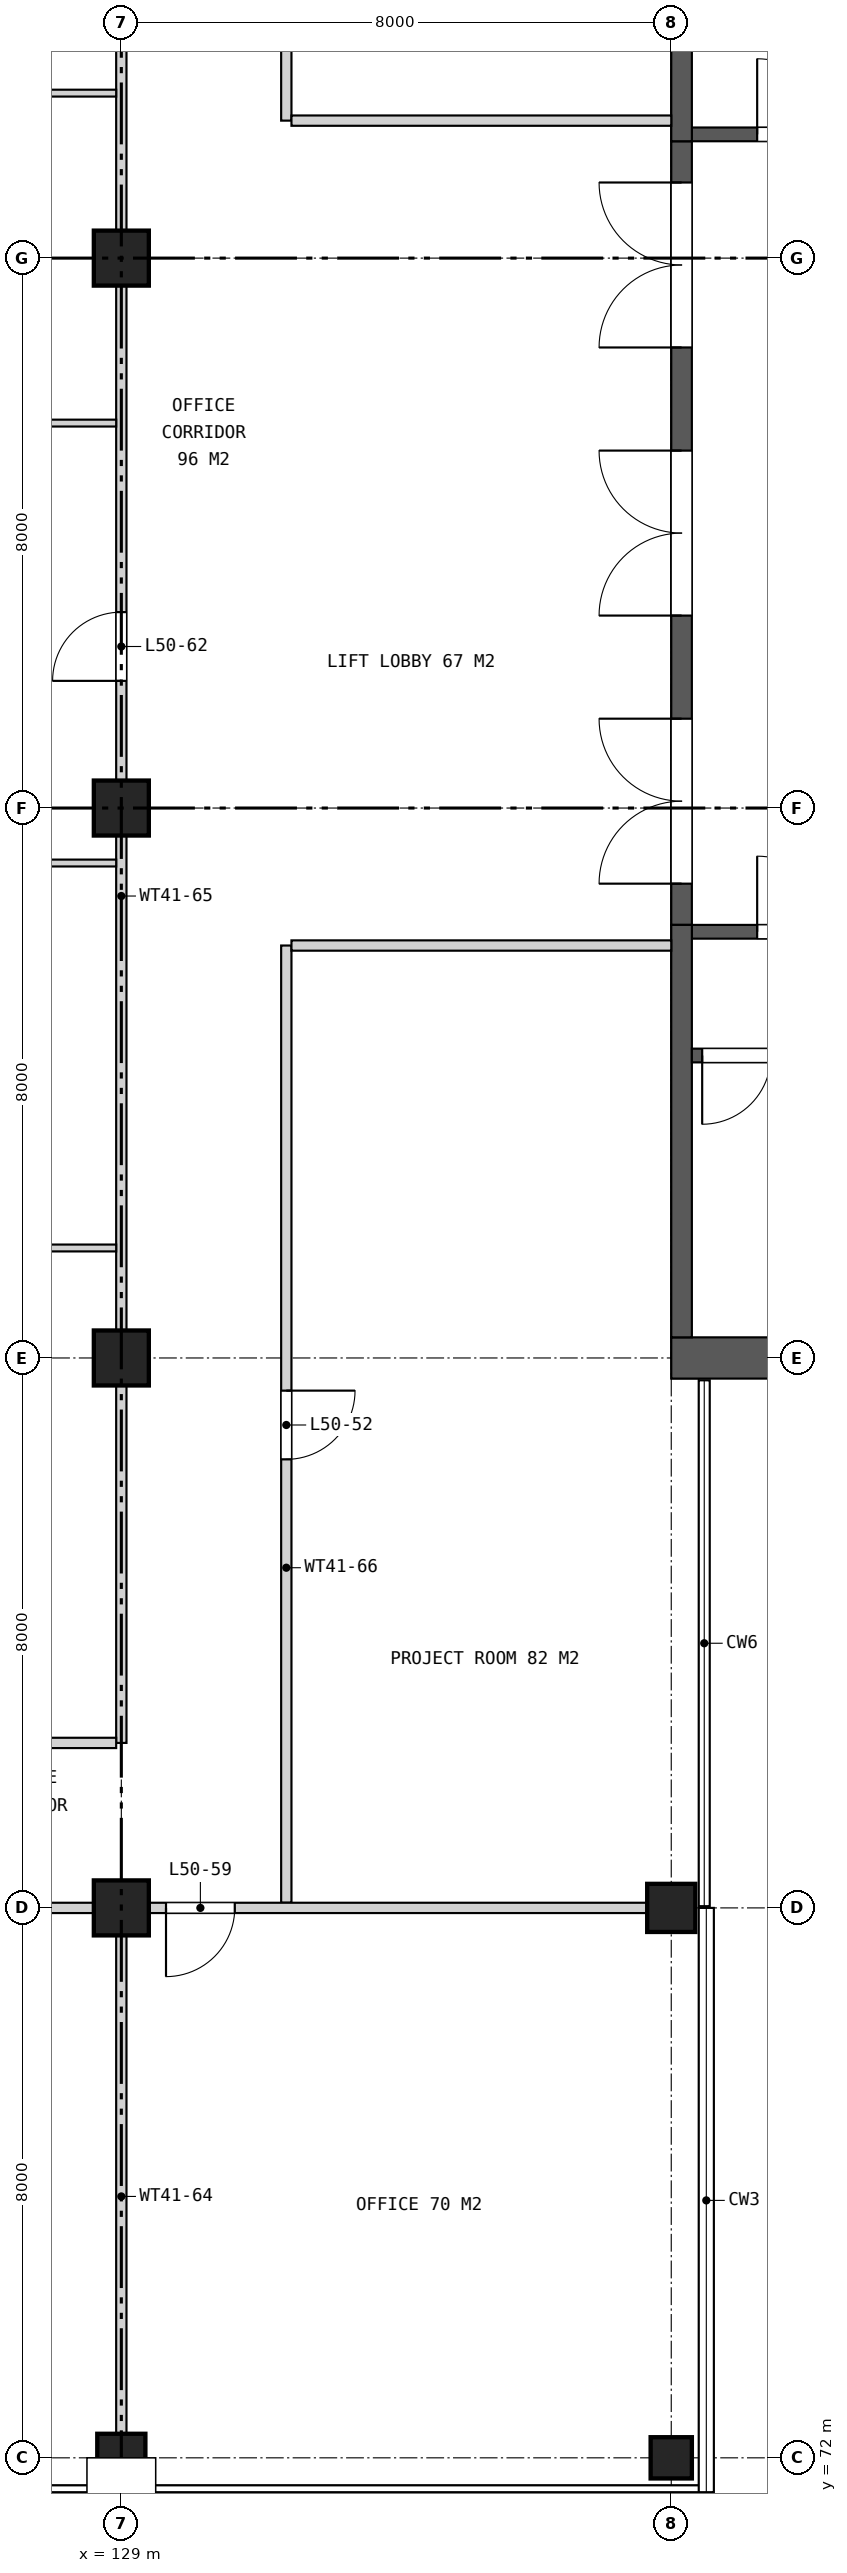
"""IFC4 building model, lengths in metres.
Left out: names, types, materials, properties, quantities, classifications, styles, units other than length and angle.
Written with IfcOpenShell. Run it as: python <this file> out.ifc"""

import sys

from ifc_helpers import new_model, si_unit, direction, frame, frame_2d, origin, origin_2d, place, context, subcontext, project, spatial, rectangle, extrude, element, fill, save


model = new_model("IFC4")
c1 = context("Model", 3, precision=1e-05, world=origin(), true_north=direction((0.0, 1.0)))
c2 = subcontext(c1, "Body", "Model", "MODEL_VIEW")
j1 = project(units=[si_unit("LENGTHUNIT", "METRE"), si_unit("PLANEANGLEUNIT", "RADIAN")], contexts=[c1])
p1 = place(None, origin())
s1 = spatial("IfcSite", under=j1, at=p1, CompositionType="ELEMENT")
p2 = place(p1, origin())
s2 = spatial("IfcBuilding", under=s1, at=p2, CompositionType="ELEMENT")
p3 = place(p2, frame((0.0, 0.0, 233.5)))
s3 = spatial("IfcBuildingStorey", under=s2, at=p3, CompositionType="ELEMENT", Elevation=233.5)
p4 = place(p3, frame((129.0, 72.0, 0.0), z_axis=(0.0, 0.0, 1.0), x_axis=(1.0, 0.0, 0.0)))
e1 = element("IfcColumn", 1, at=p4, inside=s3, PredefinedType="COLUMN", context=c2, shape_type="SweptSolid", body=[
    extrude(rectangle(XDim=0.7, YDim=0.7, at=origin_2d()), origin(), (0.0, 0.0, 1.0), 4.2),
])
for number, where, z_axis, x_axis in (
    (2, (129.0, 80.0, 0.0), (0.0, 0.0, 1.0), (1.0, 0.0, 0.0)),
    (3, (129.0, 88.0, 0.0), (0.0, 0.0, 1.0), (1.0, 0.0, 0.0)),
    (4, (129.0, 96.0, 0.0), (0.0, 0.0, 1.0), (1.0, 0.0, 0.0)),
    (5, (129.0, 104.0, 0.0), (0.0, 0.0, 1.0), (1.0, 0.0, 0.0)),
):
    element("IfcColumn", number, at=place(p3, frame(where, z_axis=z_axis, x_axis=x_axis)), inside=s3, PredefinedType="COLUMN", context=c2, shape_type="SweptSolid", body=[
        extrude(rectangle(XDim=0.8, YDim=0.8, at=origin_2d()), origin(), (0.0, 0.0, 1.0), 4.2),
    ])
p5 = place(p3, frame((137.0, 72.0, 0.0), z_axis=(0.0, 0.0, 1.0), x_axis=(1.0, 0.0, 0.0)))
e6 = element("IfcColumn", 6, at=p5, inside=s3, PredefinedType="COLUMN", context=c2, shape_type="SweptSolid", body=[
    extrude(rectangle(XDim=0.6, YDim=0.6, at=origin_2d()), origin(), (0.0, 0.0, 1.0), 4.2),
])
p6 = place(p3, frame((137.0, 80.0, 0.0), z_axis=(0.0, 0.0, 1.0), x_axis=(1.0, 0.0, 0.0)))
e7 = element("IfcColumn", 7, at=p6, inside=s3, PredefinedType="COLUMN", context=c2, shape_type="SweptSolid", body=[
    extrude(rectangle(XDim=0.7, YDim=0.7, at=origin_2d()), origin(), (0.0, 0.0, 1.0), 4.2),
])
p7 = place(p3, frame((137.0, 88.0, 0.0), z_axis=(0.0, 0.0, 1.0), x_axis=(1.0, 0.0, 0.0)))
e8 = element("IfcWall", 8, at=p7, inside=s3, PredefinedType="SHEAR", context=c2, shape_type="SweptSolid", body=[
    extrude(rectangle(XDim=7.1, YDim=0.6, at=frame_2d((3.55, 0.0))), origin(), (0.0, 0.0, 1.0), 4.2),
])
p8 = place(p3, frame((137.15, 94.3, 0.0), z_axis=(0.0, 0.0, 1.0), x_axis=(0.0, 1.0, 0.0)))
e9 = element("IfcWall", 9, at=p8, inside=s3, PredefinedType="SHEAR", context=c2, shape_type="SweptSolid", body=[
    extrude(rectangle(XDim=11.4, YDim=0.3, at=frame_2d((5.7, 0.0))), origin(), (0.0, 0.0, 1.0), 4.2),
])
p9 = place(p8, frame((0.6, 0.0, 0.0)))
e10 = element("IfcOpeningElement", 10, at=p9, cuts=e9, PredefinedType="OPENING", context=c2, shape_type="SweptSolid", body=[
    extrude(rectangle(XDim=2.4, YDim=2.4, at=frame_2d((1.2, 1.2))), frame((0.0, 0.16, 0.0), z_axis=(0.0, -1.0, 0.0), x_axis=(1.0, 0.0, 0.0)), (0.0, 0.0, 1.0), 0.32),
])
p10 = place(p8, frame((4.5, 0.0, 0.0)))
e11 = element("IfcOpeningElement", 11, at=p10, cuts=e9, PredefinedType="OPENING", context=c2, shape_type="SweptSolid", body=[
    extrude(rectangle(XDim=2.4, YDim=2.4, at=frame_2d((1.2, 1.2))), frame((0.0, 0.16, 0.0), z_axis=(0.0, -1.0, 0.0), x_axis=(1.0, 0.0, 0.0)), (0.0, 0.0, 1.0), 0.32),
])
p11 = place(p8, frame((8.4, 0.0, 0.0)))
e12 = element("IfcOpeningElement", 12, at=p11, cuts=e9, PredefinedType="OPENING", context=c2, shape_type="SweptSolid", body=[
    extrude(rectangle(XDim=2.4, YDim=2.4, at=frame_2d((1.2, 1.2))), frame((0.0, 0.16, 0.0), z_axis=(0.0, -1.0, 0.0), x_axis=(1.0, 0.0, 0.0)), (0.0, 0.0, 1.0), 0.32),
])
p12 = place(p3, frame((137.3, 105.8, 0.0), z_axis=(0.0, 0.0, 1.0), x_axis=(1.0, 0.0, 0.0)))
e13 = element("IfcWall", 13, at=p12, inside=s3, PredefinedType="SHEAR", context=c2, shape_type="SweptSolid", body=[
    extrude(rectangle(XDim=15.4, YDim=0.2, at=frame_2d((7.7, 0.0))), origin(), (0.0, 0.0, 1.0), 4.2),
])
p13 = place(p12, frame((0.95, 0.0, 0.0)))
e14 = element("IfcOpeningElement", 14, at=p13, cuts=e13, PredefinedType="OPENING", context=c2, shape_type="SweptSolid", body=[
    extrude(rectangle(XDim=1.1, YDim=2.1, at=frame_2d((0.55, 1.05))), frame((0.0, 0.11, 0.0), z_axis=(0.0, -1.0, 0.0), x_axis=(1.0, 0.0, 0.0)), (0.0, 0.0, 1.0), 0.22),
])
p14 = place(p3, frame((137.15, 105.7, 0.0), z_axis=(0.0, 0.0, 1.0), x_axis=(0.0, 1.0, 0.0)))
e15 = element("IfcWall", 15, at=p14, inside=s3, PredefinedType="SHEAR", context=c2, shape_type="SweptSolid", body=[
    extrude(rectangle(XDim=6.0, YDim=0.3, at=frame_2d((3.0, 0.0))), origin(), (0.0, 0.0, 1.0), 4.2),
])
p15 = place(p3, frame((137.3, 94.2, 0.0), z_axis=(0.0, 0.0, 1.0), x_axis=(1.0, 0.0, 0.0)))
e16 = element("IfcWall", 16, at=p15, inside=s3, PredefinedType="SHEAR", context=c2, shape_type="SweptSolid", body=[
    extrude(rectangle(XDim=15.4, YDim=0.2, at=frame_2d((7.7, 0.0))), origin(), (0.0, 0.0, 1.0), 4.2),
])
p16 = place(p15, frame((0.95, 0.0, 0.0)))
e17 = element("IfcOpeningElement", 17, at=p16, cuts=e16, PredefinedType="OPENING", context=c2, shape_type="SweptSolid", body=[
    extrude(rectangle(XDim=1.1, YDim=2.1, at=frame_2d((0.55, 1.05))), frame((0.0, 0.11, 0.0), z_axis=(0.0, -1.0, 0.0), x_axis=(1.0, 0.0, 0.0)), (0.0, 0.0, 1.0), 0.22),
])
p17 = place(p3, frame((137.15, 88.3, 0.0), z_axis=(0.0, 0.0, 1.0), x_axis=(0.0, 1.0, 0.0)))
e18 = element("IfcWall", 18, at=p17, inside=s3, PredefinedType="SHEAR", context=c2, shape_type="SweptSolid", body=[
    extrude(rectangle(XDim=6.0, YDim=0.3, at=frame_2d((3.0, 0.0))), origin(), (0.0, 0.0, 1.0), 4.2),
])
p18 = place(p3, frame((137.3, 92.4, 0.0), z_axis=(0.0, 0.0, 1.0), x_axis=(1.0, 0.0, 0.0)))
e19 = element("IfcWall", 19, at=p18, inside=s3, PredefinedType="SHEAR", context=c2, shape_type="SweptSolid", body=[
    extrude(rectangle(XDim=6.8, YDim=0.2, at=frame_2d((3.4, 0.0))), origin(), (0.0, 0.0, 1.0), 4.2),
])
p19 = place(p18, frame((0.15, 0.0, 0.0)))
e20 = element("IfcOpeningElement", 20, at=p19, cuts=e19, PredefinedType="OPENING", context=c2, shape_type="SweptSolid", body=[
    extrude(rectangle(XDim=1.0, YDim=2.1, at=frame_2d((0.5, 1.05))), frame((0.0, 0.11, 0.0), z_axis=(0.0, -1.0, 0.0), x_axis=(1.0, 0.0, 0.0)), (0.0, 0.0, 1.0), 0.22),
])
p20 = place(p3, frame((129.0, 71.68, 0.0), z_axis=(0.0, 0.0, 1.0), x_axis=(0.0, 1.0, 0.0)))
e21 = element("IfcWall", 21, at=p20, inside=s3, PredefinedType="PARTITIONING", context=c2, shape_type="SweptSolid", body=[
    extrude(rectangle(XDim=8.245, YDim=0.15, at=frame_2d((4.123, 0.0))), origin(), (0.0, 0.0, 1.0), 3.255),
])
p21 = place(p3, frame((129.0, 82.4, 0.0), z_axis=(0.0, 0.0, 1.0), x_axis=(0.0, 1.0, 0.0)))
e22 = element("IfcWall", 22, at=p21, inside=s3, PredefinedType="PARTITIONING", context=c2, shape_type="SweptSolid", body=[
    extrude(rectangle(XDim=35.2, YDim=0.15, at=frame_2d((17.6, 0.0))), origin(), (0.0, 0.0, 1.0), 3.255),
])
p22 = place(p21, frame((15.45, 0.0, 0.0)))
e23 = element("IfcOpeningElement", 23, at=p22, cuts=e22, PredefinedType="OPENING", context=c2, shape_type="SweptSolid", body=[
    extrude(rectangle(XDim=1.0, YDim=2.1, at=frame_2d((0.5, 1.05))), frame((0.0, 0.085, 0.0), z_axis=(0.0, -1.0, 0.0), x_axis=(1.0, 0.0, 0.0)), (0.0, 0.0, 1.0), 0.17),
])
p23 = place(p21, frame((26.75, 0.0, 0.0)))
e24 = element("IfcOpeningElement", 24, at=p23, cuts=e22, PredefinedType="OPENING", context=c2, shape_type="SweptSolid", body=[
    extrude(rectangle(XDim=1.0, YDim=2.1, at=frame_2d((0.5, 1.05))), frame((0.0, 0.085, 0.0), z_axis=(0.0, -1.0, 0.0), x_axis=(1.0, 0.0, 0.0)), (0.0, 0.0, 1.0), 0.17),
])
p24 = place(p3, frame((131.4, 80.075, 0.0), z_axis=(0.0, 0.0, 1.0), x_axis=(0.0, 1.0, 0.0)))
e25 = element("IfcWall", 25, at=p24, inside=s3, PredefinedType="PARTITIONING", context=c2, shape_type="SweptSolid", body=[
    extrude(rectangle(XDim=13.925, YDim=0.15, at=frame_2d((6.962, 0.0))), origin(), (0.0, 0.0, 1.0), 3.255),
])
p25 = place(p24, frame((6.45, 0.0, 0.0)))
e26 = element("IfcOpeningElement", 26, at=p25, cuts=e25, PredefinedType="OPENING", context=c2, shape_type="SweptSolid", body=[
    extrude(rectangle(XDim=1.0, YDim=2.1, at=frame_2d((0.5, 1.05))), frame((0.0, 0.085, 0.0), z_axis=(0.0, -1.0, 0.0), x_axis=(1.0, 0.0, 0.0)), (0.0, 0.0, 1.0), 0.17),
])
p26 = place(p3, frame((131.4, 106.0, 0.0), z_axis=(0.0, 0.0, 1.0), x_axis=(0.0, 1.0, 0.0)))
e27 = element("IfcWall", 27, at=p26, inside=s3, PredefinedType="PARTITIONING", context=c2, shape_type="SweptSolid", body=[
    extrude(rectangle(XDim=13.925, YDim=0.15, at=frame_2d((6.962, 0.0))), origin(), (0.0, 0.0, 1.0), 3.255),
])
p27 = place(p26, frame((2.45, 0.0, 0.0)))
e28 = element("IfcOpeningElement", 28, at=p27, cuts=e27, PredefinedType="OPENING", context=c2, shape_type="SweptSolid", body=[
    extrude(rectangle(XDim=1.0, YDim=2.1, at=frame_2d((0.5, 1.05))), frame((0.0, 0.085, 0.0), z_axis=(0.0, -1.0, 0.0), x_axis=(1.0, 0.0, 0.0)), (0.0, 0.0, 1.0), 0.17),
])
p28 = place(p26, frame((9.45, 0.0, 0.0)))
e29 = element("IfcOpeningElement", 29, at=p28, cuts=e27, PredefinedType="OPENING", context=c2, shape_type="SweptSolid", body=[
    extrude(rectangle(XDim=1.0, YDim=2.1, at=frame_2d((0.5, 1.05))), frame((0.0, 0.085, 0.0), z_axis=(0.0, -1.0, 0.0), x_axis=(1.0, 0.0, 0.0)), (0.0, 0.0, 1.0), 0.17),
])
p29 = place(p3, frame((112.68, 80.0, 0.0), z_axis=(0.0, 0.0, 1.0), x_axis=(1.0, 0.0, 0.0)))
e30 = element("IfcWall", 30, at=p29, inside=s3, PredefinedType="PARTITIONING", context=c2, shape_type="SweptSolid", body=[
    extrude(rectangle(XDim=24.64, YDim=0.15, at=frame_2d((12.32, 0.0))), origin(), (0.0, 0.0, 1.0), 3.255),
])
p30 = place(p29, frame((11.37, 0.0, 0.0)))
e31 = element("IfcOpeningElement", 31, at=p30, cuts=e30, PredefinedType="OPENING", context=c2, shape_type="SweptSolid", body=[
    extrude(rectangle(XDim=1.8, YDim=2.1, at=frame_2d((0.9, 1.05))), frame((0.0, 0.085, 0.0), z_axis=(0.0, -1.0, 0.0), x_axis=(1.0, 0.0, 0.0)), (0.0, 0.0, 1.0), 0.17),
])
p31 = place(p29, frame((16.97, 0.0, 0.0)))
e32 = element("IfcOpeningElement", 32, at=p31, cuts=e30, PredefinedType="OPENING", context=c2, shape_type="SweptSolid", body=[
    extrude(rectangle(XDim=1.0, YDim=2.1, at=frame_2d((0.5, 1.05))), frame((0.0, 0.085, 0.0), z_axis=(0.0, -1.0, 0.0), x_axis=(1.0, 0.0, 0.0)), (0.0, 0.0, 1.0), 0.17),
])
p32 = place(p3, frame((121.075, 82.4, 0.0), z_axis=(0.0, 0.0, 1.0), x_axis=(1.0, 0.0, 0.0)))
e33 = element("IfcWall", 33, at=p32, inside=s3, PredefinedType="PARTITIONING", context=c2, shape_type="SweptSolid", body=[
    extrude(rectangle(XDim=7.85, YDim=0.15, at=frame_2d((3.925, 0.0))), origin(), (0.0, 0.0, 1.0), 3.255),
])
p33 = place(p32, frame((3.45, 0.0, 0.0)))
e34 = element("IfcOpeningElement", 34, at=p33, cuts=e33, PredefinedType="OPENING", context=c2, shape_type="SweptSolid", body=[
    extrude(rectangle(XDim=1.0, YDim=2.1, at=frame_2d((0.5, 1.05))), frame((0.0, 0.085, 0.0), z_axis=(0.0, -1.0, 0.0), x_axis=(1.0, 0.0, 0.0)), (0.0, 0.0, 1.0), 0.17),
])
p34 = place(p3, frame((121.075, 89.6, 0.0), z_axis=(0.0, 0.0, 1.0), x_axis=(1.0, 0.0, 0.0)))
e35 = element("IfcWall", 35, at=p34, inside=s3, PredefinedType="PARTITIONING", context=c2, shape_type="SweptSolid", body=[
    extrude(rectangle(XDim=7.85, YDim=0.1, at=frame_2d((3.925, 0.0))), origin(), (0.0, 0.0, 1.0), 3.255),
])
p35 = place(p3, frame((131.475, 94.0, 0.0), z_axis=(0.0, 0.0, 1.0), x_axis=(1.0, 0.0, 0.0)))
e36 = element("IfcWall", 36, at=p35, inside=s3, PredefinedType="PARTITIONING", context=c2, shape_type="SweptSolid", body=[
    extrude(rectangle(XDim=5.525, YDim=0.15, at=frame_2d((2.762, 0.0))), origin(), (0.0, 0.0, 1.0), 3.255),
])
for number, where, z_axis, x_axis in (
    (37, (121.075, 95.2, 0.0), (0.0, 0.0, 1.0), (1.0, 0.0, 0.0)),
    (38, (121.075, 101.6, 0.0), (0.0, 0.0, 1.0), (1.0, 0.0, 0.0)),
):
    element("IfcWall", number, at=place(p3, frame(where, z_axis=z_axis, x_axis=x_axis)), inside=s3, PredefinedType="PARTITIONING", context=c2, shape_type="SweptSolid", body=[
        extrude(rectangle(XDim=7.85, YDim=0.1, at=frame_2d((3.925, 0.0))), origin(), (0.0, 0.0, 1.0), 3.255),
    ])
p36 = place(p3, frame((131.475, 106.0, 0.0), z_axis=(0.0, 0.0, 1.0), x_axis=(1.0, 0.0, 0.0)))
e39 = element("IfcWall", 39, at=p36, inside=s3, PredefinedType="PARTITIONING", context=c2, shape_type="SweptSolid", body=[
    extrude(rectangle(XDim=5.525, YDim=0.15, at=frame_2d((2.762, 0.0))), origin(), (0.0, 0.0, 1.0), 3.255),
])
p37 = place(p3, frame((121.075, 106.4, 0.0), z_axis=(0.0, 0.0, 1.0), x_axis=(1.0, 0.0, 0.0)))
e40 = element("IfcWall", 40, at=p37, inside=s3, PredefinedType="PARTITIONING", context=c2, shape_type="SweptSolid", body=[
    extrude(rectangle(XDim=7.85, YDim=0.1, at=frame_2d((3.925, 0.0))), origin(), (0.0, 0.0, 1.0), 3.255),
])
p38 = place(p9, origin())
e41 = element("IfcDoor", 41, at=p38, inside=s3, OperationType="DOUBLE_DOOR_SINGLE_SWING", PredefinedType="DOOR", context=c2, shape_type="SweptSolid", body=[
    extrude(rectangle(XDim=2.4, YDim=2.4, at=frame_2d((1.2, 1.2))), frame((0.0, 0.025, 0.0), z_axis=(0.0, -1.0, 0.0), x_axis=(1.0, 0.0, 0.0)), (0.0, 0.0, 1.0), 0.05),
])
fill(e10, e41)
p39 = place(p10, origin())
e42 = element("IfcDoor", 42, at=p39, inside=s3, OperationType="DOUBLE_DOOR_SINGLE_SWING", PredefinedType="DOOR", context=c2, shape_type="SweptSolid", body=[
    extrude(rectangle(XDim=2.4, YDim=2.4, at=frame_2d((1.2, 1.2))), frame((0.0, 0.025, 0.0), z_axis=(0.0, -1.0, 0.0), x_axis=(1.0, 0.0, 0.0)), (0.0, 0.0, 1.0), 0.05),
])
fill(e11, e42)
p40 = place(p11, origin())
e43 = element("IfcDoor", 43, at=p40, inside=s3, OperationType="DOUBLE_DOOR_SINGLE_SWING", PredefinedType="DOOR", context=c2, shape_type="SweptSolid", body=[
    extrude(rectangle(XDim=2.4, YDim=2.4, at=frame_2d((1.2, 1.2))), frame((0.0, 0.025, 0.0), z_axis=(0.0, -1.0, 0.0), x_axis=(1.0, 0.0, 0.0)), (0.0, 0.0, 1.0), 0.05),
])
fill(e12, e43)
p41 = place(p13, origin())
e44 = element("IfcDoor", 44, at=p41, inside=s3, OperationType="SINGLE_SWING_LEFT", PredefinedType="DOOR", context=c2, shape_type="SweptSolid", body=[
    extrude(rectangle(XDim=1.1, YDim=2.1, at=frame_2d((0.55, 1.05))), frame((0.0, 0.025, 0.0), z_axis=(0.0, -1.0, 0.0), x_axis=(1.0, 0.0, 0.0)), (0.0, 0.0, 1.0), 0.05),
])
fill(e14, e44)
p42 = place(p16, origin())
e45 = element("IfcDoor", 45, at=p42, inside=s3, OperationType="SINGLE_SWING_LEFT", PredefinedType="DOOR", context=c2, shape_type="SweptSolid", body=[
    extrude(rectangle(XDim=1.1, YDim=2.1, at=frame_2d((0.55, 1.05))), frame((0.0, 0.025, 0.0), z_axis=(0.0, -1.0, 0.0), x_axis=(1.0, 0.0, 0.0)), (0.0, 0.0, 1.0), 0.05),
])
fill(e17, e45)
p43 = place(p19, frame((1.0, 0.0, 0.0), z_axis=(0.0, 0.0, 1.0), x_axis=(-1.0, 0.0, 0.0)))
e46 = element("IfcDoor", 46, at=p43, inside=s3, OperationType="SINGLE_SWING_RIGHT", PredefinedType="DOOR", context=c2, shape_type="SweptSolid", body=[
    extrude(rectangle(XDim=1.0, YDim=2.1, at=frame_2d((0.5, 1.05))), frame((0.0, 0.025, 0.0), z_axis=(0.0, -1.0, 0.0), x_axis=(1.0, 0.0, 0.0)), (0.0, 0.0, 1.0), 0.05),
])
fill(e20, e46)
p44 = place(p25, frame((1.0, 0.0, 0.0), z_axis=(0.0, 0.0, 1.0), x_axis=(-1.0, 0.0, 0.0)))
e47 = element("IfcDoor", 47, at=p44, inside=s3, OperationType="SINGLE_SWING_LEFT", PredefinedType="DOOR", context=c2, shape_type="SweptSolid", body=[
    extrude(rectangle(XDim=1.0, YDim=2.1, at=frame_2d((0.5, 1.05))), frame((0.0, 0.025, 0.0), z_axis=(0.0, -1.0, 0.0), x_axis=(1.0, 0.0, 0.0)), (0.0, 0.0, 1.0), 0.05),
])
fill(e26, e47)
p45 = place(p31, frame((1.0, 0.0, 0.0), z_axis=(0.0, 0.0, 1.0), x_axis=(-1.0, 0.0, 0.0)))
e48 = element("IfcDoor", 48, at=p45, inside=s3, OperationType="SINGLE_SWING_RIGHT", PredefinedType="DOOR", context=c2, shape_type="SweptSolid", body=[
    extrude(rectangle(XDim=1.0, YDim=2.1, at=frame_2d((0.5, 1.05))), frame((0.0, 0.025, 0.0), z_axis=(0.0, -1.0, 0.0), x_axis=(1.0, 0.0, 0.0)), (0.0, 0.0, 1.0), 0.05),
])
fill(e32, e48)
p46 = place(p22, origin())
e49 = element("IfcDoor", 49, at=p46, inside=s3, OperationType="SINGLE_SWING_LEFT", PredefinedType="DOOR", context=c2, shape_type="SweptSolid", body=[
    extrude(rectangle(XDim=1.0, YDim=2.1, at=frame_2d((0.5, 1.05))), frame((0.0, 0.025, 0.0), z_axis=(0.0, -1.0, 0.0), x_axis=(1.0, 0.0, 0.0)), (0.0, 0.0, 1.0), 0.05),
])
fill(e23, e49)
save(model, sys.argv[1])
